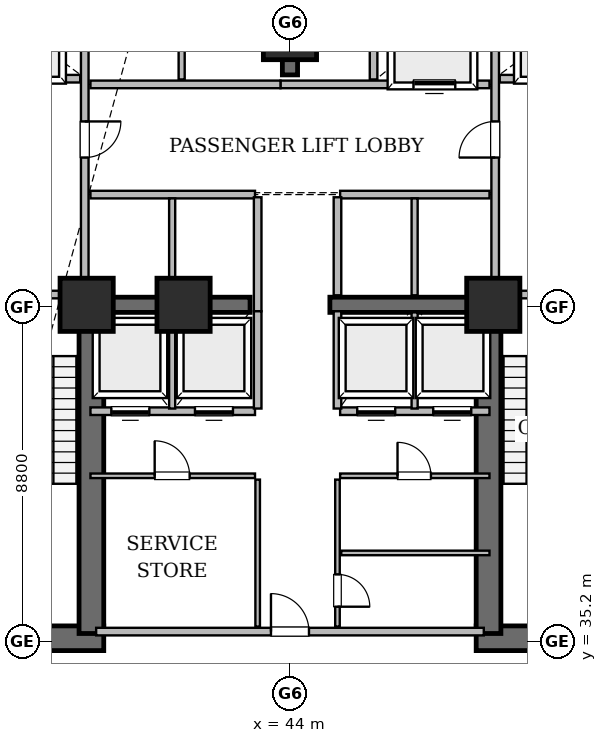
"""IFC4 building model, lengths in metres.
Left out: names, types, materials, properties, quantities, classifications, styles, units other than length and angle.
Written with IfcOpenShell. Run it as: python <this file> out.ifc"""

import sys

from ifc_helpers import new_model, si_unit, direction, frame, frame_2d, origin, origin_2d, place, context, subcontext, project, spatial, rectangle, extrude, element, fill, save


model = new_model("IFC4")
c1 = context("Model", 3, precision=1e-05, world=origin(), true_north=direction((0.0, 1.0)))
c2 = subcontext(c1, "Body", "Model", "MODEL_VIEW")
j1 = project(units=[si_unit("LENGTHUNIT", "METRE"), si_unit("PLANEANGLEUNIT", "RADIAN")], contexts=[c1])
p1 = place(None, origin())
s1 = spatial("IfcSite", under=j1, at=p1, CompositionType="ELEMENT")
p2 = place(p1, origin())
s2 = spatial("IfcBuilding", under=s1, at=p2, CompositionType="ELEMENT")
p3 = place(p2, frame((0.0, 0.0, 14.4)))
s3 = spatial("IfcBuildingStorey", under=s2, at=p3, CompositionType="ELEMENT", Elevation=14.4)
for number, where, z_axis, x_axis in (
    (1, (34.95, 35.275, 0.0), (0.0, 0.0, 1.0), (1.0, 0.0, 0.0)),
    (2, (48.9, 35.275, 0.0), (0.0, 0.0, 1.0), (1.0, 0.0, 0.0)),
):
    element("IfcWall", number, at=place(p3, frame(where, z_axis=z_axis, x_axis=x_axis)), inside=s3, PredefinedType="SHEAR", context=c2, shape_type="SweptSolid", body=[
        extrude(rectangle(XDim=4.15, YDim=0.65, at=frame_2d((2.075, 0.0))), origin(), (0.0, 0.0, 1.0), 4.5),
    ])
for number, where, z_axis, x_axis in (
    (3, (38.775, 35.4, 0.0), (0.0, 0.0, 1.0), (0.0, 1.0, 0.0)),
    (4, (49.225, 35.4, 0.0), (0.0, 0.0, 1.0), (0.0, 1.0, 0.0)),
):
    element("IfcWall", number, at=place(p3, frame(where, z_axis=z_axis, x_axis=x_axis)), inside=s3, PredefinedType="SHEAR", context=c2, shape_type="SweptSolid", body=[
        extrude(rectangle(XDim=8.95, YDim=0.65, at=frame_2d((4.475, 0.0))), origin(), (0.0, 0.0, 1.0), 4.5),
    ])
p4 = place(p3, frame((44.0, 50.1, 0.0), z_axis=(0.0, 0.0, 1.0), x_axis=(0.0, 1.0, 0.0)))
e5 = element("IfcWall", 5, at=p4, inside=s3, PredefinedType="SHEAR", context=c2, shape_type="SweptSolid", body=[
    extrude(rectangle(XDim=2.1, YDim=0.4, at=frame_2d((1.05, 0.0))), origin(), (0.0, 0.0, 1.0), 4.5),
])
for number, where, z_axis, x_axis in (
    (6, (38.75, 44.05, 0.0), (0.0, 0.0, 1.0), (1.0, 0.0, 0.0)),
    (7, (45.05, 44.05, 0.0), (0.0, 0.0, 1.0), (1.0, 0.0, 0.0)),
):
    element("IfcWall", number, at=place(p3, frame(where, z_axis=z_axis, x_axis=x_axis)), inside=s3, PredefinedType="SHEAR", context=c2, shape_type="SweptSolid", body=[
        extrude(rectangle(XDim=4.2, YDim=0.4, at=frame_2d((2.1, 0.0))), origin(), (0.0, 0.0, 1.0), 4.5),
    ])
for number, where, z_axis, x_axis in (
    (8, (38.65, 44.05, 0.0), (0.0, 0.0, 1.0), (1.0, 0.0, 0.0)),
    (9, (49.35, 44.05, 0.0), (0.0, 0.0, 1.0), (1.0, 0.0, 0.0)),
    (10, (44.0, 51.2, 0.0), (0.0, 0.0, 1.0), (1.0, 0.0, 0.0)),
    (11, (41.2, 44.05, 0.0), (0.0, 0.0, 1.0), (1.0, 0.0, 0.0)),
):
    element("IfcColumn", number, at=place(p3, frame(where, z_axis=z_axis, x_axis=x_axis)), inside=s3, PredefinedType="COLUMN", context=c2, shape_type="SweptSolid", body=[
        extrude(rectangle(XDim=1.4, YDim=1.4, at=origin_2d()), origin(), (0.0, 0.0, 1.0), 4.8),
    ])
p5 = place(p3, frame((38.9, 35.45, 0.0), z_axis=(0.0, 0.0, 1.0), x_axis=(1.0, 0.0, 0.0)))
e12 = element("IfcWall", 12, at=p5, inside=s3, PredefinedType="SOLIDWALL", context=c2, shape_type="SweptSolid", body=[
    extrude(rectangle(XDim=10.2, YDim=0.2, at=frame_2d((5.1, 0.0))), origin(), (0.0, 0.0, 1.0), 4.5),
])
p6 = place(p5, frame((4.6, 0.0, 0.0)))
e13 = element("IfcOpeningElement", 13, at=p6, cuts=e12, PredefinedType="OPENING", context=c2, shape_type="SweptSolid", body=[
    extrude(rectangle(XDim=1.0, YDim=2.15, at=frame_2d((0.5, 1.075))), frame((0.0, 0.11, 0.0), z_axis=(0.0, -1.0, 0.0), x_axis=(1.0, 0.0, 0.0)), (0.0, 0.0, 1.0), 0.22),
])
p7 = place(p3, frame((38.6, 44.5, 0.0), z_axis=(0.0, 0.0, 1.0), x_axis=(0.0, 1.0, 0.0)))
e14 = element("IfcWall", 14, at=p7, inside=s3, PredefinedType="SOLIDWALL", context=c2, shape_type="SweptSolid", body=[
    extrude(rectangle(XDim=7.92, YDim=0.2, at=frame_2d((3.96, 0.0))), origin(), (0.0, 0.0, 1.0), 4.5),
])
p8 = place(p7, frame((3.425, 0.0, 0.0)))
e15 = element("IfcOpeningElement", 15, at=p8, cuts=e14, PredefinedType="OPENING", context=c2, shape_type="SweptSolid", body=[
    extrude(rectangle(XDim=0.95, YDim=2.15, at=frame_2d((0.475, 1.075))), frame((0.0, 0.11, 0.0), z_axis=(0.0, -1.0, 0.0), x_axis=(1.0, 0.0, 0.0)), (0.0, 0.0, 1.0), 0.22),
])
p9 = place(p3, frame((49.4, 44.5, 0.0), z_axis=(0.0, 0.0, 1.0), x_axis=(0.0, 1.0, 0.0)))
e16 = element("IfcWall", 16, at=p9, inside=s3, PredefinedType="SOLIDWALL", context=c2, shape_type="SweptSolid", body=[
    extrude(rectangle(XDim=7.92, YDim=0.2, at=frame_2d((3.96, 0.0))), origin(), (0.0, 0.0, 1.0), 3.588),
])
p10 = place(p9, frame((3.425, 0.0, 0.0)))
e17 = element("IfcOpeningElement", 17, at=p10, cuts=e16, PredefinedType="OPENING", context=c2, shape_type="SweptSolid", body=[
    extrude(rectangle(XDim=0.95, YDim=2.15, at=frame_2d((0.475, 1.075))), frame((0.0, 0.11, 0.0), z_axis=(0.0, -1.0, 0.0), x_axis=(1.0, 0.0, 0.0)), (0.0, 0.0, 1.0), 0.22),
])
p11 = place(p3, frame((43.75, 49.85, 0.0), z_axis=(0.0, 0.0, 1.0), x_axis=(1.0, 0.0, 0.0)))
e18 = element("IfcWall", 18, at=p11, inside=s3, PredefinedType="SOLIDWALL", context=c2, shape_type="SweptSolid", body=[
    extrude(rectangle(XDim=5.5, YDim=0.2, at=frame_2d((2.75, 0.0))), origin(), (0.0, 0.0, 1.0), 3.588),
])
p12 = place(p11, frame((3.5, 0.0, 0.0)))
e19 = element("IfcOpeningElement", 19, at=p12, cuts=e18, PredefinedType="OPENING", context=c2, shape_type="SweptSolid", body=[
    extrude(rectangle(XDim=1.1, YDim=2.15, at=frame_2d((0.55, 1.075))), frame((0.0, 0.11, 0.0), z_axis=(0.0, -1.0, 0.0), x_axis=(1.0, 0.0, 0.0)), (0.0, 0.0, 1.0), 0.22),
])
p13 = place(p3, frame((38.75, 41.25, 0.0), z_axis=(0.0, 0.0, 1.0), x_axis=(1.0, 0.0, 0.0)))
e20 = element("IfcWall", 20, at=p13, inside=s3, PredefinedType="SOLIDWALL", context=c2, shape_type="SweptSolid", body=[
    extrude(rectangle(XDim=4.33, YDim=0.2, at=frame_2d((2.165, 0.0))), origin(), (0.0, 0.0, 1.0), 4.5),
])
p14 = place(p13, frame((0.55, 0.0, 0.0)))
e21 = element("IfcOpeningElement", 21, at=p14, cuts=e20, PredefinedType="OPENING", context=c2, shape_type="SweptSolid", body=[
    extrude(rectangle(XDim=1.0, YDim=2.15, at=frame_2d((0.5, 1.075))), frame((0.0, 0.11, 0.0), z_axis=(0.0, -1.0, 0.0), x_axis=(1.0, 0.0, 0.0)), (0.0, 0.0, 1.0), 0.22),
])
p15 = place(p13, frame((2.75, 0.0, 0.0)))
e22 = element("IfcOpeningElement", 22, at=p15, cuts=e20, PredefinedType="OPENING", context=c2, shape_type="SweptSolid", body=[
    extrude(rectangle(XDim=1.0, YDim=2.15, at=frame_2d((0.5, 1.075))), frame((0.0, 0.11, 0.0), z_axis=(0.0, -1.0, 0.0), x_axis=(1.0, 0.0, 0.0)), (0.0, 0.0, 1.0), 0.22),
])
p16 = place(p3, frame((38.75, 39.55, 0.0), z_axis=(0.0, 0.0, 1.0), x_axis=(1.0, 0.0, 0.0)))
e23 = element("IfcWall", 23, at=p16, inside=s3, PredefinedType="PARTITIONING", context=c2, shape_type="SweptSolid", body=[
    extrude(rectangle(XDim=4.33, YDim=0.12, at=frame_2d((2.165, 0.0))), origin(), (0.0, 0.0, 1.0), 4.5),
])
p17 = place(p16, frame((1.69, 0.0, 0.0)))
e24 = element("IfcOpeningElement", 24, at=p17, cuts=e23, PredefinedType="OPENING", context=c2, shape_type="SweptSolid", body=[
    extrude(rectangle(XDim=0.92, YDim=2.1, at=frame_2d((0.46, 1.05))), frame((0.0, 0.07, 0.0), z_axis=(0.0, -1.0, 0.0), x_axis=(1.0, 0.0, 0.0)), (0.0, 0.0, 1.0), 0.14),
])
p18 = place(p3, frame((45.32, 41.25, 0.0), z_axis=(0.0, 0.0, 1.0), x_axis=(1.0, 0.0, 0.0)))
e25 = element("IfcWall", 25, at=p18, inside=s3, PredefinedType="SOLIDWALL", context=c2, shape_type="SweptSolid", body=[
    extrude(rectangle(XDim=3.93, YDim=0.2, at=frame_2d((1.965, 0.0))), origin(), (0.0, 0.0, 1.0), 4.5),
])
p19 = place(p18, frame((0.45, 0.0, 0.0)))
e26 = element("IfcOpeningElement", 26, at=p19, cuts=e25, PredefinedType="OPENING", context=c2, shape_type="SweptSolid", body=[
    extrude(rectangle(XDim=1.0, YDim=2.15, at=frame_2d((0.5, 1.075))), frame((0.0, 0.11, 0.0), z_axis=(0.0, -1.0, 0.0), x_axis=(1.0, 0.0, 0.0)), (0.0, 0.0, 1.0), 0.22),
])
p20 = place(p18, frame((2.45, 0.0, 0.0)))
e27 = element("IfcOpeningElement", 27, at=p20, cuts=e25, PredefinedType="OPENING", context=c2, shape_type="SweptSolid", body=[
    extrude(rectangle(XDim=1.0, YDim=2.15, at=frame_2d((0.5, 1.075))), frame((0.0, 0.11, 0.0), z_axis=(0.0, -1.0, 0.0), x_axis=(1.0, 0.0, 0.0)), (0.0, 0.0, 1.0), 0.22),
])
p21 = place(p3, frame((45.32, 39.55, 0.0), z_axis=(0.0, 0.0, 1.0), x_axis=(1.0, 0.0, 0.0)))
e28 = element("IfcWall", 28, at=p21, inside=s3, PredefinedType="PARTITIONING", context=c2, shape_type="SweptSolid", body=[
    extrude(rectangle(XDim=3.93, YDim=0.12, at=frame_2d((1.965, 0.0))), origin(), (0.0, 0.0, 1.0), 4.5),
])
p22 = place(p21, frame((1.51, 0.0, 0.0)))
e29 = element("IfcOpeningElement", 29, at=p22, cuts=e28, PredefinedType="OPENING", context=c2, shape_type="SweptSolid", body=[
    extrude(rectangle(XDim=0.88, YDim=2.1, at=frame_2d((0.44, 1.05))), frame((0.0, 0.07, 0.0), z_axis=(0.0, -1.0, 0.0), x_axis=(1.0, 0.0, 0.0)), (0.0, 0.0, 1.0), 0.14),
])
p23 = place(p3, frame((45.25, 35.58, 0.0), z_axis=(0.0, 0.0, 1.0), x_axis=(0.0, 1.0, 0.0)))
e30 = element("IfcWall", 30, at=p23, inside=s3, PredefinedType="PARTITIONING", context=c2, shape_type="SweptSolid", body=[
    extrude(rectangle(XDim=3.87, YDim=0.12, at=frame_2d((1.935, 0.0))), origin(), (0.0, 0.0, 1.0), 4.5),
])
p24 = place(p23, frame((0.525, 0.0, 0.0)))
e31 = element("IfcOpeningElement", 31, at=p24, cuts=e30, PredefinedType="OPENING", context=c2, shape_type="SweptSolid", body=[
    extrude(rectangle(XDim=0.85, YDim=2.1, at=frame_2d((0.425, 1.05))), frame((0.0, 0.07, 0.0), z_axis=(0.0, -1.0, 0.0), x_axis=(1.0, 0.0, 0.0)), (0.0, 0.0, 1.0), 0.14),
])
p25 = place(p3, frame((35.65, 44.32, 0.0), z_axis=(0.0, 0.0, 1.0), x_axis=(1.0, 0.0, 0.0)))
e32 = element("IfcWall", 32, at=p25, inside=s3, PredefinedType="SOLIDWALL", context=c2, shape_type="SweptSolid", body=[
    extrude(rectangle(XDim=2.8, YDim=0.2, at=frame_2d((1.4, 0.0))), origin(), (0.0, 0.0, 1.0), 4.5),
])
p26 = place(p25, frame((0.9, 0.0, 0.0)))
e33 = element("IfcOpeningElement", 33, at=p26, cuts=e32, PredefinedType="OPENING", context=c2, shape_type="SweptSolid", body=[
    extrude(rectangle(XDim=1.0, YDim=2.15, at=frame_2d((0.5, 1.075))), frame((0.0, 0.11, 0.0), z_axis=(0.0, -1.0, 0.0), x_axis=(1.0, 0.0, 0.0)), (0.0, 0.0, 1.0), 0.22),
])
p27 = place(p3, frame((49.55, 44.32, 0.0), z_axis=(0.0, 0.0, 1.0), x_axis=(1.0, 0.0, 0.0)))
e34 = element("IfcWall", 34, at=p27, inside=s3, PredefinedType="SOLIDWALL", context=c2, shape_type="SweptSolid", body=[
    extrude(rectangle(XDim=2.8, YDim=0.2, at=frame_2d((1.4, 0.0))), origin(), (0.0, 0.0, 1.0), 3.588),
])
p28 = place(p27, frame((0.9, 0.0, 0.0)))
e35 = element("IfcOpeningElement", 35, at=p28, cuts=e34, PredefinedType="OPENING", context=c2, shape_type="SweptSolid", body=[
    extrude(rectangle(XDim=1.0, YDim=2.15, at=frame_2d((0.5, 1.075))), frame((0.0, 0.11, 0.0), z_axis=(0.0, -1.0, 0.0), x_axis=(1.0, 0.0, 0.0)), (0.0, 0.0, 1.0), 0.22),
])
p29 = place(p3, frame((35.68, 50.0, 0.0), z_axis=(0.0, 0.0, 1.0), x_axis=(1.0, 0.0, 0.0)))
e36 = element("IfcWall", 36, at=p29, inside=s3, PredefinedType="SOLIDWALL", context=c2, shape_type="SweptSolid", body=[
    extrude(rectangle(XDim=2.8, YDim=0.2, at=frame_2d((1.4, 0.0))), origin(), (0.0, 0.0, 1.0), 4.5),
])
p30 = place(p29, frame((0.85, 0.0, 0.0)))
e37 = element("IfcOpeningElement", 37, at=p30, cuts=e36, PredefinedType="OPENING", context=c2, shape_type="SweptSolid", body=[
    extrude(rectangle(XDim=1.1, YDim=2.15, at=frame_2d((0.55, 1.075))), frame((0.0, 0.11, 0.0), z_axis=(0.0, -1.0, 0.0), x_axis=(1.0, 0.0, 0.0)), (0.0, 0.0, 1.0), 0.22),
])
p31 = place(p3, frame((49.52, 50.0, 0.0), z_axis=(0.0, 0.0, 1.0), x_axis=(1.0, 0.0, 0.0)))
e38 = element("IfcWall", 38, at=p31, inside=s3, PredefinedType="SOLIDWALL", context=c2, shape_type="SweptSolid", body=[
    extrude(rectangle(XDim=2.8, YDim=0.2, at=frame_2d((1.4, 0.0))), origin(), (0.0, 0.0, 1.0), 4.5),
])
p32 = place(p31, frame((0.85, 0.0, 0.0)))
e39 = element("IfcOpeningElement", 39, at=p32, cuts=e38, PredefinedType="OPENING", context=c2, shape_type="SweptSolid", body=[
    extrude(rectangle(XDim=1.1, YDim=2.15, at=frame_2d((0.55, 1.075))), frame((0.0, 0.11, 0.0), z_axis=(0.0, -1.0, 0.0), x_axis=(1.0, 0.0, 0.0)), (0.0, 0.0, 1.0), 0.22),
])
p33 = place(p3, frame((38.75, 49.85, 0.0), z_axis=(0.0, 0.0, 1.0), x_axis=(1.0, 0.0, 0.0)))
e40 = element("IfcWall", 40, at=p33, inside=s3, PredefinedType="SOLIDWALL", context=c2, shape_type="SweptSolid", body=[
    extrude(rectangle(XDim=5.0, YDim=0.2, at=frame_2d((2.5, 0.0))), origin(), (0.0, 0.0, 1.0), 4.5),
])
p34 = place(p3, frame((38.75, 46.95, 0.0), z_axis=(0.0, 0.0, 1.0), x_axis=(1.0, 0.0, 0.0)))
e41 = element("IfcWall", 41, at=p34, inside=s3, PredefinedType="SOLIDWALL", context=c2, shape_type="SweptSolid", body=[
    extrude(rectangle(XDim=4.33, YDim=0.2, at=frame_2d((2.165, 0.0))), origin(), (0.0, 0.0, 1.0), 4.5),
])
p35 = place(p3, frame((45.32, 46.95, 0.0), z_axis=(0.0, 0.0, 1.0), x_axis=(1.0, 0.0, 0.0)))
e42 = element("IfcWall", 42, at=p35, inside=s3, PredefinedType="SOLIDWALL", context=c2, shape_type="SweptSolid", body=[
    extrude(rectangle(XDim=3.93, YDim=0.2, at=frame_2d((1.965, 0.0))), origin(), (0.0, 0.0, 1.0), 3.588),
])
p36 = place(p3, frame((45.35, 37.52, 0.0), z_axis=(0.0, 0.0, 1.0), x_axis=(1.0, 0.0, 0.0)))
e43 = element("IfcWall", 43, at=p36, inside=s3, PredefinedType="PARTITIONING", context=c2, shape_type="SweptSolid", body=[
    extrude(rectangle(XDim=3.9, YDim=0.12, at=frame_2d((1.95, 0.0))), origin(), (0.0, 0.0, 1.0), 4.5),
])
p37 = place(p3, frame((43.15, 35.58, 0.0), z_axis=(0.0, 0.0, 1.0), x_axis=(0.0, 1.0, 0.0)))
e44 = element("IfcWall", 44, at=p37, inside=s3, PredefinedType="PARTITIONING", context=c2, shape_type="SweptSolid", body=[
    extrude(rectangle(XDim=3.87, YDim=0.12, at=frame_2d((1.935, 0.0))), origin(), (0.0, 0.0, 1.0), 4.5),
])
p38 = place(p3, frame((43.15, 43.88, 0.0), z_axis=(0.0, 0.0, 1.0), x_axis=(0.0, 1.0, 0.0)))
e45 = element("IfcWall", 45, at=p38, inside=s3, PredefinedType="SOLIDWALL", context=c2, shape_type="SweptSolid", body=[
    extrude(rectangle(XDim=3.0, YDim=0.2, at=frame_2d((1.5, 0.0))), origin(), (0.0, 0.0, 1.0), 4.5),
])
p39 = place(p3, frame((45.25, 44.3, 0.0), z_axis=(0.0, 0.0, 1.0), x_axis=(0.0, 1.0, 0.0)))
e46 = element("IfcWall", 46, at=p39, inside=s3, PredefinedType="SOLIDWALL", context=c2, shape_type="SweptSolid", body=[
    extrude(rectangle(XDim=2.58, YDim=0.2, at=frame_2d((1.29, 0.0))), origin(), (0.0, 0.0, 1.0), 4.5),
])
for number, where, z_axis, x_axis in (
    (47, (43.15, 41.32, 0.0), (0.0, 0.0, 1.0), (0.0, 1.0, 0.0)),
    (48, (45.25, 41.32, 0.0), (0.0, 0.0, 1.0), (0.0, 1.0, 0.0)),
):
    element("IfcWall", number, at=place(p3, frame(where, z_axis=z_axis, x_axis=x_axis)), inside=s3, PredefinedType="SOLIDWALL", context=c2, shape_type="SweptSolid", body=[
        extrude(rectangle(XDim=2.56, YDim=0.2, at=frame_2d((1.28, 0.0))), origin(), (0.0, 0.0, 1.0), 4.5),
    ])
p40 = place(p3, frame((40.9, 44.3, 0.0), z_axis=(0.0, 0.0, 1.0), x_axis=(0.0, 1.0, 0.0)))
e49 = element("IfcWall", 49, at=p40, inside=s3, PredefinedType="SOLIDWALL", context=c2, shape_type="SweptSolid", body=[
    extrude(rectangle(XDim=2.55, YDim=0.16, at=frame_2d((1.275, 0.0))), origin(), (0.0, 0.0, 1.0), 4.5),
])
p41 = place(p3, frame((47.28, 44.3, 0.0), z_axis=(0.0, 0.0, 1.0), x_axis=(0.0, 1.0, 0.0)))
e50 = element("IfcWall", 50, at=p41, inside=s3, PredefinedType="SOLIDWALL", context=c2, shape_type="SweptSolid", body=[
    extrude(rectangle(XDim=2.55, YDim=0.16, at=frame_2d((1.275, 0.0))), origin(), (0.0, 0.0, 1.0), 3.588),
])
for number, where, z_axis, x_axis in (
    (51, (40.9, 41.32, 0.0), (0.0, 0.0, 1.0), (0.0, 1.0, 0.0)),
    (52, (47.28, 41.32, 0.0), (0.0, 0.0, 1.0), (0.0, 1.0, 0.0)),
):
    element("IfcWall", number, at=place(p3, frame(where, z_axis=z_axis, x_axis=x_axis)), inside=s3, PredefinedType="SOLIDWALL", context=c2, shape_type="SweptSolid", body=[
        extrude(rectangle(XDim=2.53, YDim=0.16, at=frame_2d((1.265, 0.0))), origin(), (0.0, 0.0, 1.0), 4.5),
    ])
p42 = place(p3, frame((41.15, 49.98, 0.0), z_axis=(0.0, 0.0, 1.0), x_axis=(0.0, 1.0, 0.0)))
e53 = element("IfcWall", 53, at=p42, inside=s3, PredefinedType="SOLIDWALL", context=c2, shape_type="SweptSolid", body=[
    extrude(rectangle(XDim=2.37, YDim=0.16, at=frame_2d((1.185, 0.0))), origin(), (0.0, 0.0, 1.0), 4.5),
])
p43 = place(p3, frame((46.2, 49.98, 0.0), z_axis=(0.0, 0.0, 1.0), x_axis=(0.0, 1.0, 0.0)))
e54 = element("IfcWall", 54, at=p43, inside=s3, PredefinedType="SOLIDWALL", context=c2, shape_type="SweptSolid", body=[
    extrude(rectangle(XDim=2.37, YDim=0.2, at=frame_2d((1.185, 0.0))), origin(), (0.0, 0.0, 1.0), 4.5),
])
p44 = place(p8, frame((0.95, 0.0, 0.0), z_axis=(0.0, 0.0, 1.0), x_axis=(-1.0, 0.0, 0.0)))
e55 = element("IfcDoor", 55, at=p44, inside=s3, OperationType="SINGLE_SWING_RIGHT", PredefinedType="DOOR", context=c2, shape_type="SweptSolid", body=[
    extrude(rectangle(XDim=0.95, YDim=2.15, at=frame_2d((0.475, 1.075))), frame((0.0, 0.025, 0.0), z_axis=(0.0, -1.0, 0.0), x_axis=(1.0, 0.0, 0.0)), (0.0, 0.0, 1.0), 0.05),
])
fill(e15, e55)
p45 = place(p10, origin())
e56 = element("IfcDoor", 56, at=p45, inside=s3, OperationType="SINGLE_SWING_LEFT", PredefinedType="DOOR", context=c2, shape_type="SweptSolid", body=[
    extrude(rectangle(XDim=0.95, YDim=2.15, at=frame_2d((0.475, 1.075))), frame((0.0, 0.025, 0.0), z_axis=(0.0, -1.0, 0.0), x_axis=(1.0, 0.0, 0.0)), (0.0, 0.0, 1.0), 0.05),
])
fill(e17, e56)
p46 = place(p6, origin())
e57 = element("IfcDoor", 57, at=p46, inside=s3, OperationType="SINGLE_SWING_LEFT", PredefinedType="DOOR", context=c2, shape_type="SweptSolid", body=[
    extrude(rectangle(XDim=1.0, YDim=2.15, at=frame_2d((0.5, 1.075))), frame((0.0, 0.025, 0.0), z_axis=(0.0, -1.0, 0.0), x_axis=(1.0, 0.0, 0.0)), (0.0, 0.0, 1.0), 0.05),
])
fill(e13, e57)
p47 = place(p12, origin())
e58 = element("IfcDoor", 58, at=p47, inside=s3, OperationType="SLIDING_TO_LEFT", PredefinedType="DOOR", context=c2, shape_type="SweptSolid", body=[
    extrude(rectangle(XDim=1.1, YDim=2.15, at=frame_2d((0.55, 1.075))), frame((0.0, 0.025, 0.0), z_axis=(0.0, -1.0, 0.0), x_axis=(1.0, 0.0, 0.0)), (0.0, 0.0, 1.0), 0.05),
])
fill(e19, e58)
p48 = place(p14, frame((1.0, 0.0, 0.0), z_axis=(0.0, 0.0, 1.0), x_axis=(-1.0, 0.0, 0.0)))
e59 = element("IfcDoor", 59, at=p48, inside=s3, OperationType="SLIDING_TO_LEFT", PredefinedType="DOOR", context=c2, shape_type="SweptSolid", body=[
    extrude(rectangle(XDim=1.0, YDim=2.15, at=frame_2d((0.5, 1.075))), frame((0.0, 0.025, 0.0), z_axis=(0.0, -1.0, 0.0), x_axis=(1.0, 0.0, 0.0)), (0.0, 0.0, 1.0), 0.05),
])
fill(e21, e59)
p49 = place(p15, frame((1.0, 0.0, 0.0), z_axis=(0.0, 0.0, 1.0), x_axis=(-1.0, 0.0, 0.0)))
e60 = element("IfcDoor", 60, at=p49, inside=s3, OperationType="SLIDING_TO_LEFT", PredefinedType="DOOR", context=c2, shape_type="SweptSolid", body=[
    extrude(rectangle(XDim=1.0, YDim=2.15, at=frame_2d((0.5, 1.075))), frame((0.0, 0.025, 0.0), z_axis=(0.0, -1.0, 0.0), x_axis=(1.0, 0.0, 0.0)), (0.0, 0.0, 1.0), 0.05),
])
fill(e22, e60)
p50 = place(p19, frame((1.0, 0.0, 0.0), z_axis=(0.0, 0.0, 1.0), x_axis=(-1.0, 0.0, 0.0)))
e61 = element("IfcDoor", 61, at=p50, inside=s3, OperationType="SLIDING_TO_LEFT", PredefinedType="DOOR", context=c2, shape_type="SweptSolid", body=[
    extrude(rectangle(XDim=1.0, YDim=2.15, at=frame_2d((0.5, 1.075))), frame((0.0, 0.025, 0.0), z_axis=(0.0, -1.0, 0.0), x_axis=(1.0, 0.0, 0.0)), (0.0, 0.0, 1.0), 0.05),
])
fill(e26, e61)
p51 = place(p20, frame((1.0, 0.0, 0.0), z_axis=(0.0, 0.0, 1.0), x_axis=(-1.0, 0.0, 0.0)))
e62 = element("IfcDoor", 62, at=p51, inside=s3, OperationType="SLIDING_TO_LEFT", PredefinedType="DOOR", context=c2, shape_type="SweptSolid", body=[
    extrude(rectangle(XDim=1.0, YDim=2.15, at=frame_2d((0.5, 1.075))), frame((0.0, 0.025, 0.0), z_axis=(0.0, -1.0, 0.0), x_axis=(1.0, 0.0, 0.0)), (0.0, 0.0, 1.0), 0.05),
])
fill(e27, e62)
p52 = place(p24, frame((0.85, 0.0, 0.0), z_axis=(0.0, 0.0, 1.0), x_axis=(-1.0, 0.0, 0.0)))
e63 = element("IfcDoor", 63, at=p52, inside=s3, OperationType="SINGLE_SWING_LEFT", PredefinedType="DOOR", context=c2, shape_type="SweptSolid", body=[
    extrude(rectangle(XDim=0.85, YDim=2.1, at=frame_2d((0.425, 1.05))), frame((0.0, 0.025, 0.0), z_axis=(0.0, -1.0, 0.0), x_axis=(1.0, 0.0, 0.0)), (0.0, 0.0, 1.0), 0.05),
])
fill(e31, e63)
p53 = place(p17, origin())
e64 = element("IfcDoor", 64, at=p53, inside=s3, OperationType="SINGLE_SWING_LEFT", PredefinedType="DOOR", context=c2, shape_type="SweptSolid", body=[
    extrude(rectangle(XDim=0.92, YDim=2.1, at=frame_2d((0.46, 1.05))), frame((0.0, 0.025, 0.0), z_axis=(0.0, -1.0, 0.0), x_axis=(1.0, 0.0, 0.0)), (0.0, 0.0, 1.0), 0.05),
])
fill(e24, e64)
p54 = place(p22, origin())
e65 = element("IfcDoor", 65, at=p54, inside=s3, OperationType="SINGLE_SWING_LEFT", PredefinedType="DOOR", context=c2, shape_type="SweptSolid", body=[
    extrude(rectangle(XDim=0.88, YDim=2.1, at=frame_2d((0.44, 1.05))), frame((0.0, 0.025, 0.0), z_axis=(0.0, -1.0, 0.0), x_axis=(1.0, 0.0, 0.0)), (0.0, 0.0, 1.0), 0.05),
])
fill(e29, e65)
save(model, sys.argv[1])
